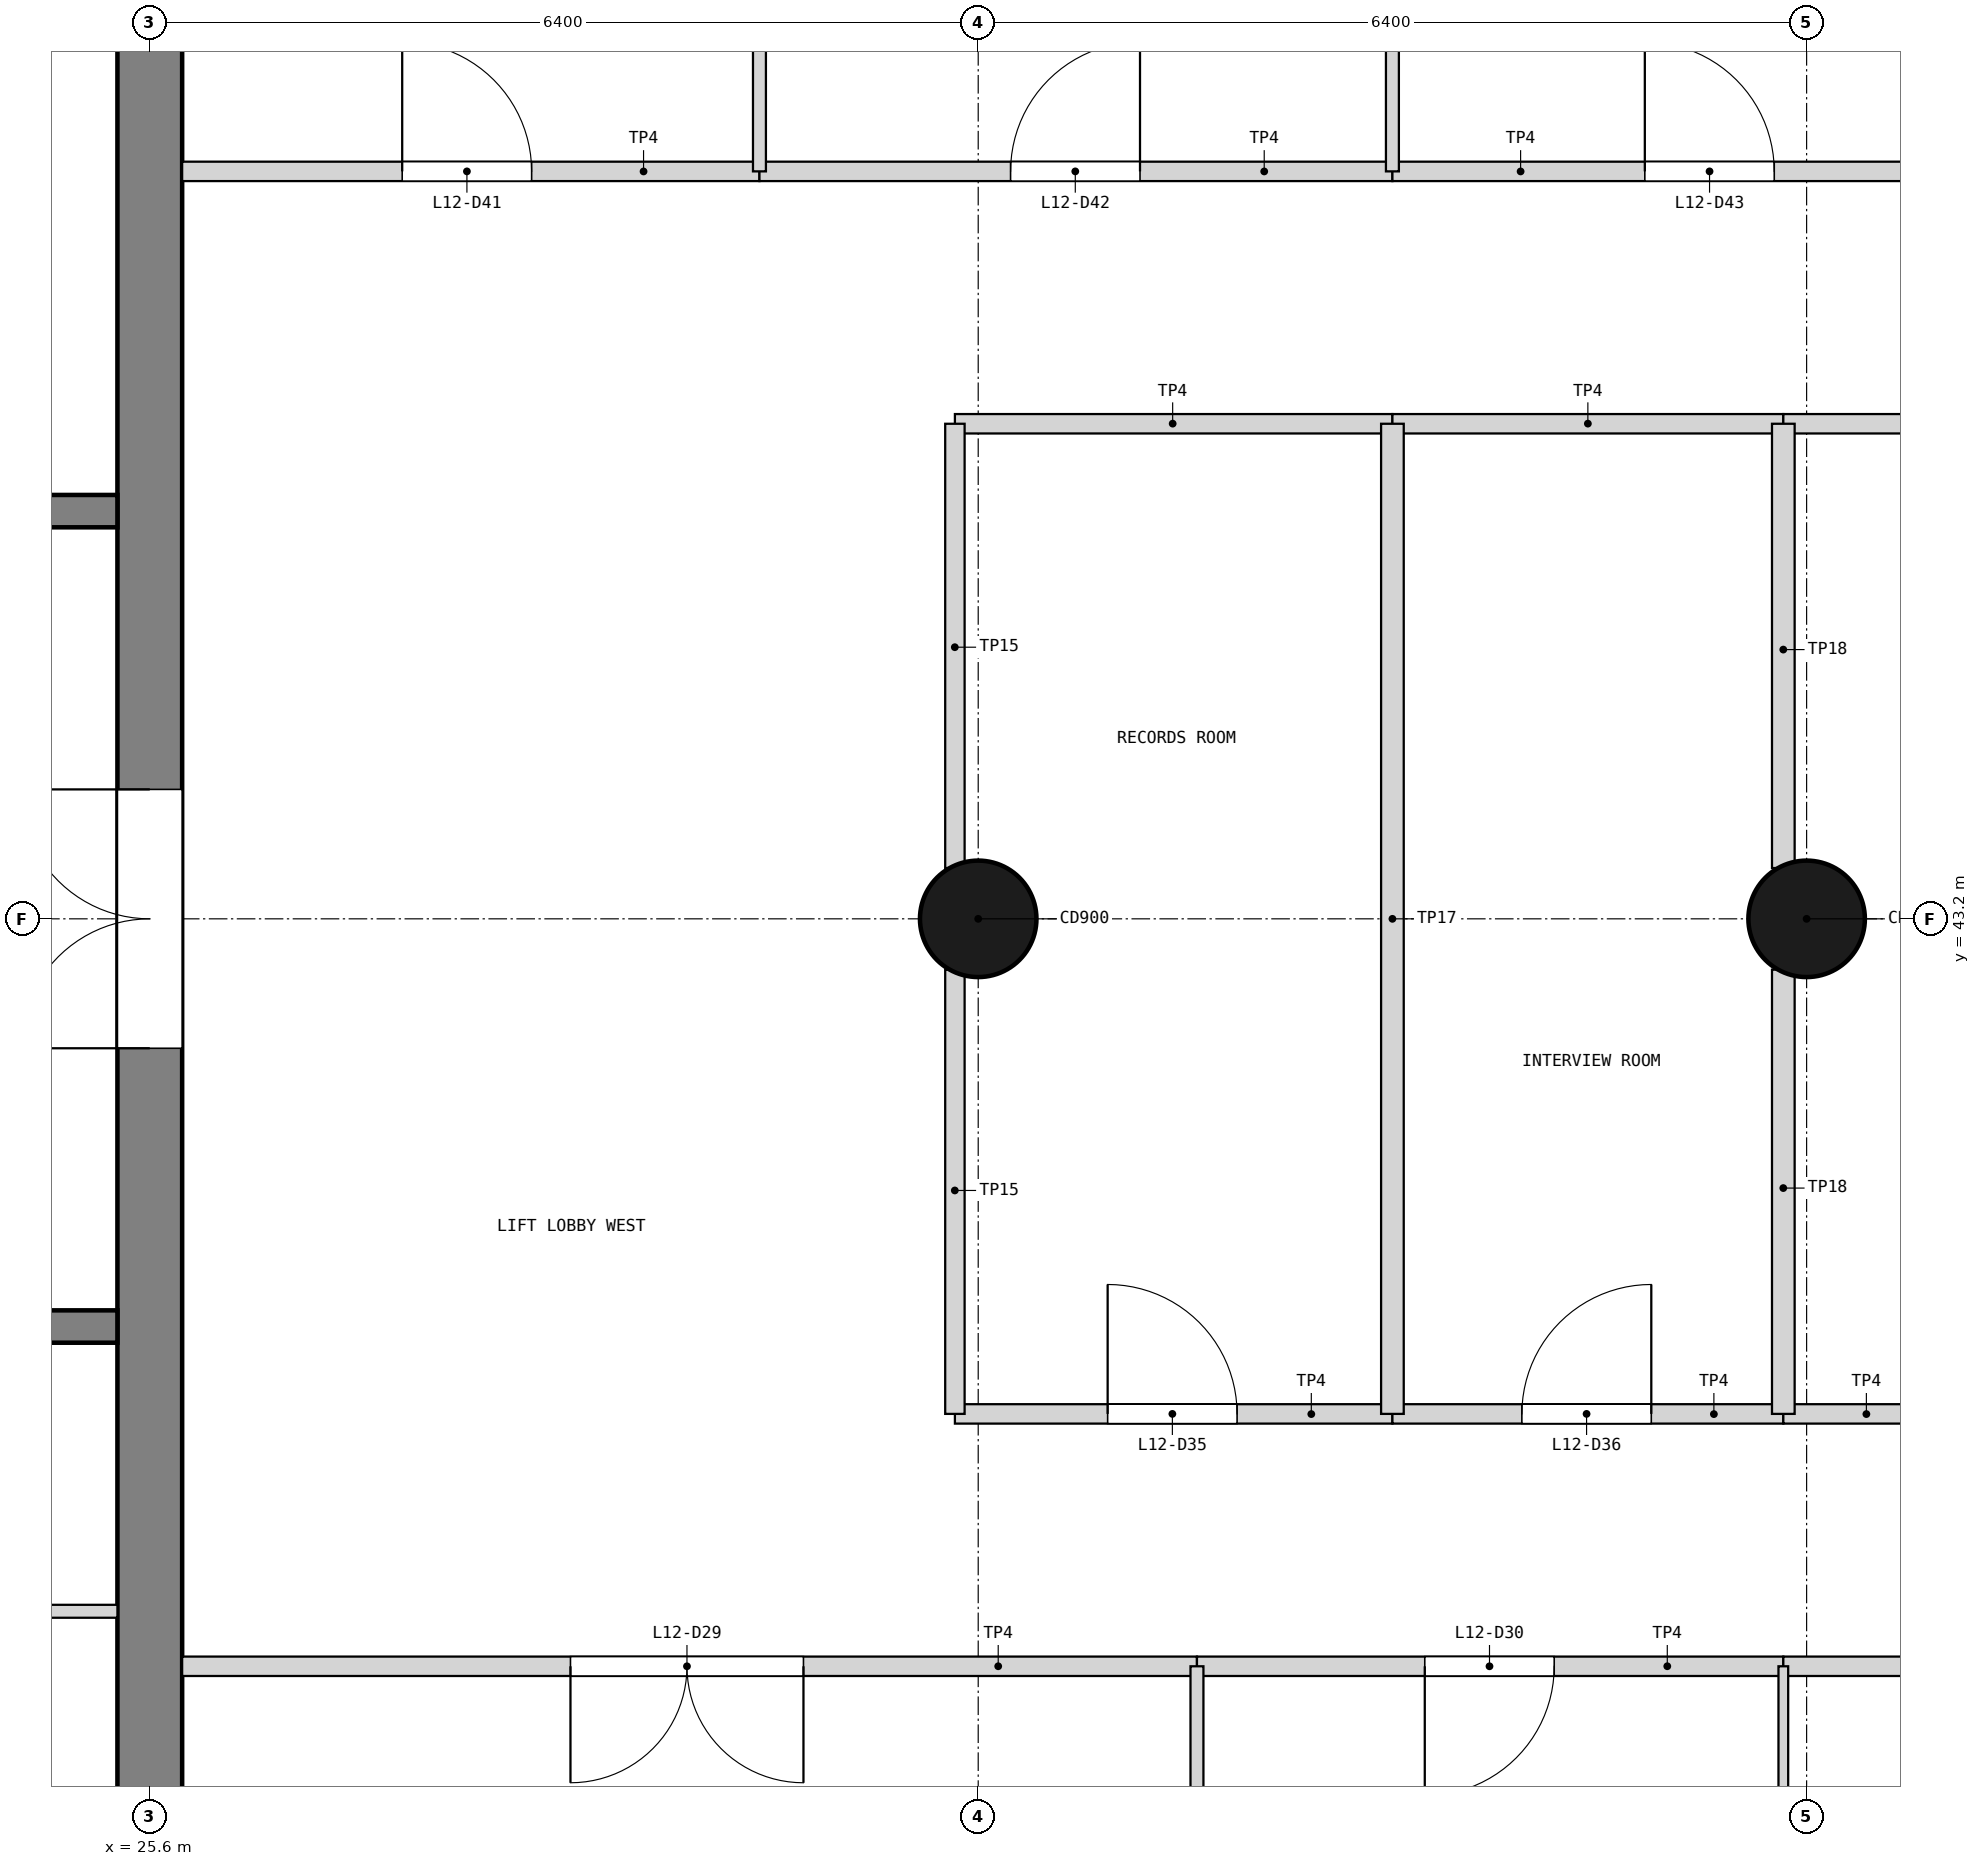
"""IFC4 building model, lengths in metres.
Left out: names, types, materials, properties, quantities, classifications, styles, units other than length and angle.
Written with IfcOpenShell. Run it as: python <this file> out.ifc"""

import sys

from ifc_helpers import new_model, si_unit, direction, frame, frame_2d, origin, origin_2d, place, context, subcontext, project, spatial, rectangle, circle, extrude, element, fill, save


model = new_model("IFC4")
c1 = context("Model", 3, precision=1e-05, world=origin(), true_north=direction((0.0, 1.0)))
c2 = subcontext(c1, "Body", "Model", "MODEL_VIEW")
j1 = project(units=[si_unit("LENGTHUNIT", "METRE"), si_unit("PLANEANGLEUNIT", "RADIAN")], contexts=[c1])
p1 = place(None, origin())
s1 = spatial("IfcSite", under=j1, at=p1, CompositionType="ELEMENT")
p2 = place(p1, origin())
s2 = spatial("IfcBuilding", under=s1, at=p2, CompositionType="ELEMENT")
p3 = place(p2, frame((0.0, 0.0, 48.3)))
s3 = spatial("IfcBuildingStorey", under=s2, at=p3, CompositionType="ELEMENT", Elevation=48.3)
p4 = place(p3, frame((25.6, 33.85, 0.0), z_axis=(0.0, 0.0, 1.0), x_axis=(0.0, 1.0, 0.0)))
e1 = element("IfcWall", 1, at=p4, inside=s3, PredefinedType="SHEAR", context=c2, shape_type="SweptSolid", body=[
    extrude(rectangle(XDim=18.7, YDim=0.5, at=frame_2d((9.35, 0.0))), origin(), (0.0, 0.0, 1.0), 3.9),
])
p5 = place(p4, frame((8.35, 0.0, 0.0)))
e2 = element("IfcOpeningElement", 2, at=p5, cuts=e1, PredefinedType="OPENING", context=c2, shape_type="SweptSolid", body=[
    extrude(rectangle(XDim=2.0, YDim=2.1, at=frame_2d((1.0, 1.05))), frame((0.0, 0.26, 0.0), z_axis=(0.0, -1.0, 0.0), x_axis=(1.0, 0.0, 0.0)), (0.0, 0.0, 1.0), 0.52),
])
for number, where, z_axis, x_axis in (
    (3, (32.0, 43.2, 0.0), (0.0, 0.0, 1.0), (1.0, 0.0, 0.0)),
    (4, (38.4, 43.2, 0.0), (0.0, 0.0, 1.0), (1.0, 0.0, 0.0)),
):
    element("IfcColumn", number, at=place(p3, frame(where, z_axis=z_axis, x_axis=x_axis)), inside=s3, PredefinedType="COLUMN", context=c2, shape_type="SweptSolid", body=[
        extrude(circle(Radius=0.45, at=origin_2d()), origin(), (0.0, 0.0, 1.0), 3.9),
    ])
for number, where, z_axis, x_axis in (
    (5, (19.875, 40.05, 0.0), (0.0, 0.0, 1.0), (1.0, 0.0, 0.0)),
    (6, (19.875, 46.35, 0.0), (0.0, 0.0, 1.0), (1.0, 0.0, 0.0)),
):
    element("IfcWall", number, at=place(p3, frame(where, z_axis=z_axis, x_axis=x_axis)), inside=s3, PredefinedType="SOLIDWALL", context=c2, shape_type="SweptSolid", body=[
        extrude(rectangle(XDim=5.475, YDim=0.25, at=frame_2d((2.738, 0.0))), origin(), (0.0, 0.0, 1.0), 3.6),
    ])
p6 = place(p3, frame((21.675, 37.85, 0.0), z_axis=(0.0, 0.0, 1.0), x_axis=(1.0, 0.0, 0.0)))
e7 = element("IfcWall", 7, at=p6, inside=s3, PredefinedType="PARTITIONING", context=c2, shape_type="SweptSolid", body=[
    extrude(rectangle(XDim=3.675, YDim=0.1, at=frame_2d((1.837, 0.0))), origin(), (0.0, 0.0, 1.0), 3.6),
])
p7 = place(p3, frame((25.85, 37.425, 0.0), z_axis=(0.0, 0.0, 1.0), x_axis=(1.0, 0.0, 0.0)))
e8 = element("IfcWall", 8, at=p7, inside=s3, PredefinedType="PARTITIONING", context=c2, shape_type="SweptSolid", body=[
    extrude(rectangle(XDim=7.84, YDim=0.15, at=frame_2d((3.92, 0.0))), origin(), (0.0, 0.0, 1.0), 3.68),
])
p8 = place(p7, frame((3.0, 0.0, 0.0)))
e9 = element("IfcOpeningElement", 9, at=p8, cuts=e8, PredefinedType="OPENING", context=c2, shape_type="SweptSolid", body=[
    extrude(rectangle(XDim=1.8, YDim=2.1, at=frame_2d((0.9, 1.05))), frame((0.0, 0.085, 0.0), z_axis=(0.0, -1.0, 0.0), x_axis=(1.0, 0.0, 0.0)), (0.0, 0.0, 1.0), 0.17),
])
p9 = place(p3, frame((33.69, 37.425, 0.0), z_axis=(0.0, 0.0, 1.0), x_axis=(1.0, 0.0, 0.0)))
e10 = element("IfcWall", 10, at=p9, inside=s3, PredefinedType="PARTITIONING", context=c2, shape_type="SweptSolid", body=[
    extrude(rectangle(XDim=4.53, YDim=0.15, at=frame_2d((2.265, 0.0))), origin(), (0.0, 0.0, 1.0), 3.68),
])
p10 = place(p9, frame((1.76, 0.0, 0.0)))
e11 = element("IfcOpeningElement", 11, at=p10, cuts=e10, PredefinedType="OPENING", context=c2, shape_type="SweptSolid", body=[
    extrude(rectangle(XDim=1.0, YDim=2.1, at=frame_2d((0.5, 1.05))), frame((0.0, 0.085, 0.0), z_axis=(0.0, -1.0, 0.0), x_axis=(1.0, 0.0, 0.0)), (0.0, 0.0, 1.0), 0.17),
])
p11 = place(p3, frame((38.22, 37.425, 0.0), z_axis=(0.0, 0.0, 1.0), x_axis=(1.0, 0.0, 0.0)))
e12 = element("IfcWall", 12, at=p11, inside=s3, PredefinedType="PARTITIONING", context=c2, shape_type="SweptSolid", body=[
    extrude(rectangle(XDim=6.4, YDim=0.15, at=frame_2d((3.2, 0.0))), origin(), (0.0, 0.0, 1.0), 3.68),
])
p12 = place(p11, frame((2.68, 0.0, 0.0)))
e13 = element("IfcOpeningElement", 13, at=p12, cuts=e12, PredefinedType="OPENING", context=c2, shape_type="SweptSolid", body=[
    extrude(rectangle(XDim=1.0, YDim=2.1, at=frame_2d((0.5, 1.05))), frame((0.0, 0.085, 0.0), z_axis=(0.0, -1.0, 0.0), x_axis=(1.0, 0.0, 0.0)), (0.0, 0.0, 1.0), 0.17),
])
p13 = place(p3, frame((33.69, 31.3, 0.0), z_axis=(0.0, 0.0, 1.0), x_axis=(0.0, 1.0, 0.0)))
e14 = element("IfcWall", 14, at=p13, inside=s3, PredefinedType="PARTITIONING", context=c2, shape_type="SweptSolid", body=[
    extrude(rectangle(XDim=6.125, YDim=0.1, at=frame_2d((3.062, 0.0))), origin(), (0.0, 0.0, 1.0), 3.68),
])
p14 = place(p3, frame((38.22, 34.13, 0.0), z_axis=(0.0, 0.0, 1.0), x_axis=(0.0, 1.0, 0.0)))
e15 = element("IfcWall", 15, at=p14, inside=s3, PredefinedType="PARTITIONING", context=c2, shape_type="SweptSolid", body=[
    extrude(rectangle(XDim=3.295, YDim=0.075, at=frame_2d((1.647, 0.0))), origin(), (0.0, 0.0, 1.0), 2.78),
])
p15 = place(p3, frame((31.82, 39.375, 0.0), z_axis=(0.0, 0.0, 1.0), x_axis=(1.0, 0.0, 0.0)))
e16 = element("IfcWall", 16, at=p15, inside=s3, PredefinedType="PARTITIONING", context=c2, shape_type="SweptSolid", body=[
    extrude(rectangle(XDim=3.38, YDim=0.15, at=frame_2d((1.69, 0.0))), origin(), (0.0, 0.0, 1.0), 3.68),
])
p16 = place(p15, frame((1.18, 0.0, 0.0)))
e17 = element("IfcOpeningElement", 17, at=p16, cuts=e16, PredefinedType="OPENING", context=c2, shape_type="SweptSolid", body=[
    extrude(rectangle(XDim=1.0, YDim=2.1, at=frame_2d((0.5, 1.05))), frame((0.0, 0.085, 0.0), z_axis=(0.0, -1.0, 0.0), x_axis=(1.0, 0.0, 0.0)), (0.0, 0.0, 1.0), 0.17),
])
p17 = place(p3, frame((31.82, 47.025, 0.0), z_axis=(0.0, 0.0, 1.0), x_axis=(1.0, 0.0, 0.0)))
e18 = element("IfcWall", 18, at=p17, inside=s3, PredefinedType="PARTITIONING", context=c2, shape_type="SweptSolid", body=[
    extrude(rectangle(XDim=3.38, YDim=0.15, at=frame_2d((1.69, 0.0))), origin(), (0.0, 0.0, 1.0), 3.68),
])
p18 = place(p3, frame((35.2, 39.375, 0.0), z_axis=(0.0, 0.0, 1.0), x_axis=(1.0, 0.0, 0.0)))
e19 = element("IfcWall", 19, at=p18, inside=s3, PredefinedType="PARTITIONING", context=c2, shape_type="SweptSolid", body=[
    extrude(rectangle(XDim=3.02, YDim=0.15, at=frame_2d((1.51, 0.0))), origin(), (0.0, 0.0, 1.0), 3.68),
])
p19 = place(p18, frame((1.0, 0.0, 0.0)))
e20 = element("IfcOpeningElement", 20, at=p19, cuts=e19, PredefinedType="OPENING", context=c2, shape_type="SweptSolid", body=[
    extrude(rectangle(XDim=1.0, YDim=2.1, at=frame_2d((0.5, 1.05))), frame((0.0, 0.085, 0.0), z_axis=(0.0, -1.0, 0.0), x_axis=(1.0, 0.0, 0.0)), (0.0, 0.0, 1.0), 0.17),
])
p20 = place(p3, frame((35.2, 47.025, 0.0), z_axis=(0.0, 0.0, 1.0), x_axis=(1.0, 0.0, 0.0)))
e21 = element("IfcWall", 21, at=p20, inside=s3, PredefinedType="PARTITIONING", context=c2, shape_type="SweptSolid", body=[
    extrude(rectangle(XDim=3.02, YDim=0.15, at=frame_2d((1.51, 0.0))), origin(), (0.0, 0.0, 1.0), 3.68),
])
p21 = place(p3, frame((38.22, 39.375, 0.0), z_axis=(0.0, 0.0, 1.0), x_axis=(1.0, 0.0, 0.0)))
e22 = element("IfcWall", 22, at=p21, inside=s3, PredefinedType="PARTITIONING", context=c2, shape_type="SweptSolid", body=[
    extrude(rectangle(XDim=3.38, YDim=0.15, at=frame_2d((1.69, 0.0))), origin(), (0.0, 0.0, 1.0), 3.68),
])
p22 = place(p21, frame((1.23, 0.0, 0.0)))
e23 = element("IfcOpeningElement", 23, at=p22, cuts=e22, PredefinedType="OPENING", context=c2, shape_type="SweptSolid", body=[
    extrude(rectangle(XDim=1.0, YDim=2.1, at=frame_2d((0.5, 1.05))), frame((0.0, 0.085, 0.0), z_axis=(0.0, -1.0, 0.0), x_axis=(1.0, 0.0, 0.0)), (0.0, 0.0, 1.0), 0.17),
])
p23 = place(p3, frame((38.22, 47.025, 0.0), z_axis=(0.0, 0.0, 1.0), x_axis=(1.0, 0.0, 0.0)))
e24 = element("IfcWall", 24, at=p23, inside=s3, PredefinedType="PARTITIONING", context=c2, shape_type="SweptSolid", body=[
    extrude(rectangle(XDim=3.38, YDim=0.15, at=frame_2d((1.69, 0.0))), origin(), (0.0, 0.0, 1.0), 3.68),
])
p24 = place(p3, frame((35.2, 39.375, 0.0), z_axis=(0.0, 0.0, 1.0), x_axis=(0.0, 1.0, 0.0)))
e25 = element("IfcWall", 25, at=p24, inside=s3, PredefinedType="PARTITIONING", context=c2, shape_type="SweptSolid", body=[
    extrude(rectangle(XDim=7.65, YDim=0.175, at=frame_2d((3.825, 0.0))), origin(), (0.0, 0.0, 1.0), 3.08),
])
for number, where, z_axis, x_axis in (
    (26, (38.22, 39.375, 0.0), (0.0, 0.0, 1.0), (0.0, 1.0, 0.0)),
    (27, (38.22, 43.592, 0.0), (0.0, 0.0, 1.0), (0.0, 1.0, 0.0)),
):
    element("IfcWall", number, at=place(p3, frame(where, z_axis=z_axis, x_axis=x_axis)), inside=s3, PredefinedType="PARTITIONING", context=c2, shape_type="SweptSolid", body=[
        extrude(rectangle(XDim=3.433, YDim=0.175, at=frame_2d((1.716, 0.0))), origin(), (0.0, 0.0, 1.0), 2.78),
    ])
p25 = place(p3, frame((25.85, 48.975, 0.0), z_axis=(0.0, 0.0, 1.0), x_axis=(1.0, 0.0, 0.0)))
e28 = element("IfcWall", 28, at=p25, inside=s3, PredefinedType="PARTITIONING", context=c2, shape_type="SweptSolid", body=[
    extrude(rectangle(XDim=4.46, YDim=0.15, at=frame_2d((2.23, 0.0))), origin(), (0.0, 0.0, 1.0), 3.68),
])
p26 = place(p25, frame((1.7, 0.0, 0.0)))
e29 = element("IfcOpeningElement", 29, at=p26, cuts=e28, PredefinedType="OPENING", context=c2, shape_type="SweptSolid", body=[
    extrude(rectangle(XDim=1.0, YDim=2.1, at=frame_2d((0.5, 1.05))), frame((0.0, 0.085, 0.0), z_axis=(0.0, -1.0, 0.0), x_axis=(1.0, 0.0, 0.0)), (0.0, 0.0, 1.0), 0.17),
])
p27 = place(p3, frame((30.31, 48.975, 0.0), z_axis=(0.0, 0.0, 1.0), x_axis=(1.0, 0.0, 0.0)))
e30 = element("IfcWall", 30, at=p27, inside=s3, PredefinedType="PARTITIONING", context=c2, shape_type="SweptSolid", body=[
    extrude(rectangle(XDim=4.89, YDim=0.15, at=frame_2d((2.445, 0.0))), origin(), (0.0, 0.0, 1.0), 3.68),
])
p28 = place(p27, frame((1.94, 0.0, 0.0)))
e31 = element("IfcOpeningElement", 31, at=p28, cuts=e30, PredefinedType="OPENING", context=c2, shape_type="SweptSolid", body=[
    extrude(rectangle(XDim=1.0, YDim=2.1, at=frame_2d((0.5, 1.05))), frame((0.0, 0.085, 0.0), z_axis=(0.0, -1.0, 0.0), x_axis=(1.0, 0.0, 0.0)), (0.0, 0.0, 1.0), 0.17),
])
p29 = place(p3, frame((35.2, 48.975, 0.0), z_axis=(0.0, 0.0, 1.0), x_axis=(1.0, 0.0, 0.0)))
e32 = element("IfcWall", 32, at=p29, inside=s3, PredefinedType="PARTITIONING", context=c2, shape_type="SweptSolid", body=[
    extrude(rectangle(XDim=4.89, YDim=0.15, at=frame_2d((2.445, 0.0))), origin(), (0.0, 0.0, 1.0), 3.68),
])
p30 = place(p29, frame((1.95, 0.0, 0.0)))
e33 = element("IfcOpeningElement", 33, at=p30, cuts=e32, PredefinedType="OPENING", context=c2, shape_type="SweptSolid", body=[
    extrude(rectangle(XDim=1.0, YDim=2.1, at=frame_2d((0.5, 1.05))), frame((0.0, 0.085, 0.0), z_axis=(0.0, -1.0, 0.0), x_axis=(1.0, 0.0, 0.0)), (0.0, 0.0, 1.0), 0.17),
])
p31 = place(p3, frame((30.31, 48.975, 0.0), z_axis=(0.0, 0.0, 1.0), x_axis=(0.0, 1.0, 0.0)))
e34 = element("IfcWall", 34, at=p31, inside=s3, PredefinedType="PARTITIONING", context=c2, shape_type="SweptSolid", body=[
    extrude(rectangle(XDim=6.125, YDim=0.1, at=frame_2d((3.062, 0.0))), origin(), (0.0, 0.0, 1.0), 3.68),
])
p32 = place(p3, frame((35.2, 48.975, 0.0), z_axis=(0.0, 0.0, 1.0), x_axis=(0.0, 1.0, 0.0)))
e35 = element("IfcWall", 35, at=p32, inside=s3, PredefinedType="PARTITIONING", context=c2, shape_type="SweptSolid", body=[
    extrude(rectangle(XDim=6.125, YDim=0.1, at=frame_2d((3.062, 0.0))), origin(), (0.0, 0.0, 1.0), 3.08),
])
for number, where, z_axis, x_axis in (
    (36, (31.82, 39.375, 0.0), (0.0, 0.0, 1.0), (0.0, 1.0, 0.0)),
    (37, (31.82, 43.592, 0.0), (0.0, 0.0, 1.0), (0.0, 1.0, 0.0)),
):
    element("IfcWall", number, at=place(p3, frame(where, z_axis=z_axis, x_axis=x_axis)), inside=s3, PredefinedType="PARTITIONING", context=c2, shape_type="SweptSolid", body=[
        extrude(rectangle(XDim=3.433, YDim=0.15, at=frame_2d((1.716, 0.0))), origin(), (0.0, 0.0, 1.0), 2.78),
    ])
p33 = place(p5, origin())
e38 = element("IfcDoor", 38, at=p33, inside=s3, OperationType="DOUBLE_DOOR_SINGLE_SWING", PredefinedType="DOOR", context=c2, shape_type="SweptSolid", body=[
    extrude(rectangle(XDim=2.0, YDim=2.1, at=frame_2d((1.0, 1.05))), frame((0.0, 0.025, 0.0), z_axis=(0.0, -1.0, 0.0), x_axis=(1.0, 0.0, 0.0)), (0.0, 0.0, 1.0), 0.05),
])
fill(e2, e38)
p34 = place(p8, frame((1.8, 0.0, 0.0), z_axis=(0.0, 0.0, 1.0), x_axis=(-1.0, 0.0, 0.0)))
e39 = element("IfcDoor", 39, at=p34, inside=s3, OperationType="DOUBLE_DOOR_SINGLE_SWING", PredefinedType="DOOR", context=c2, shape_type="SweptSolid", body=[
    extrude(rectangle(XDim=1.8, YDim=2.1, at=frame_2d((0.9, 1.05))), frame((0.0, 0.025, 0.0), z_axis=(0.0, -1.0, 0.0), x_axis=(1.0, 0.0, 0.0)), (0.0, 0.0, 1.0), 0.05),
])
fill(e9, e39)
p35 = place(p10, frame((1.0, 0.0, 0.0), z_axis=(0.0, 0.0, 1.0), x_axis=(-1.0, 0.0, 0.0)))
e40 = element("IfcDoor", 40, at=p35, inside=s3, OperationType="SINGLE_SWING_RIGHT", PredefinedType="DOOR", context=c2, shape_type="SweptSolid", body=[
    extrude(rectangle(XDim=1.0, YDim=2.1, at=frame_2d((0.5, 1.05))), frame((0.0, 0.025, 0.0), z_axis=(0.0, -1.0, 0.0), x_axis=(1.0, 0.0, 0.0)), (0.0, 0.0, 1.0), 0.05),
])
fill(e11, e40)
p36 = place(p16, origin())
e41 = element("IfcDoor", 41, at=p36, inside=s3, OperationType="SINGLE_SWING_LEFT", PredefinedType="DOOR", context=c2, shape_type="SweptSolid", body=[
    extrude(rectangle(XDim=1.0, YDim=2.1, at=frame_2d((0.5, 1.05))), frame((0.0, 0.025, 0.0), z_axis=(0.0, -1.0, 0.0), x_axis=(1.0, 0.0, 0.0)), (0.0, 0.0, 1.0), 0.05),
])
fill(e17, e41)
p37 = place(p19, origin())
e42 = element("IfcDoor", 42, at=p37, inside=s3, OperationType="SINGLE_SWING_RIGHT", PredefinedType="DOOR", context=c2, shape_type="SweptSolid", body=[
    extrude(rectangle(XDim=1.0, YDim=2.1, at=frame_2d((0.5, 1.05))), frame((0.0, 0.025, 0.0), z_axis=(0.0, -1.0, 0.0), x_axis=(1.0, 0.0, 0.0)), (0.0, 0.0, 1.0), 0.05),
])
fill(e20, e42)
p38 = place(p26, origin())
e43 = element("IfcDoor", 43, at=p38, inside=s3, OperationType="SINGLE_SWING_LEFT", PredefinedType="DOOR", context=c2, shape_type="SweptSolid", body=[
    extrude(rectangle(XDim=1.0, YDim=2.1, at=frame_2d((0.5, 1.05))), frame((0.0, 0.025, 0.0), z_axis=(0.0, -1.0, 0.0), x_axis=(1.0, 0.0, 0.0)), (0.0, 0.0, 1.0), 0.05),
])
fill(e29, e43)
p39 = place(p28, origin())
e44 = element("IfcDoor", 44, at=p39, inside=s3, OperationType="SINGLE_SWING_RIGHT", PredefinedType="DOOR", context=c2, shape_type="SweptSolid", body=[
    extrude(rectangle(XDim=1.0, YDim=2.1, at=frame_2d((0.5, 1.05))), frame((0.0, 0.025, 0.0), z_axis=(0.0, -1.0, 0.0), x_axis=(1.0, 0.0, 0.0)), (0.0, 0.0, 1.0), 0.05),
])
fill(e31, e44)
p40 = place(p30, origin())
e45 = element("IfcDoor", 45, at=p40, inside=s3, OperationType="SINGLE_SWING_LEFT", PredefinedType="DOOR", context=c2, shape_type="SweptSolid", body=[
    extrude(rectangle(XDim=1.0, YDim=2.1, at=frame_2d((0.5, 1.05))), frame((0.0, 0.025, 0.0), z_axis=(0.0, -1.0, 0.0), x_axis=(1.0, 0.0, 0.0)), (0.0, 0.0, 1.0), 0.05),
])
fill(e33, e45)
save(model, sys.argv[1])
